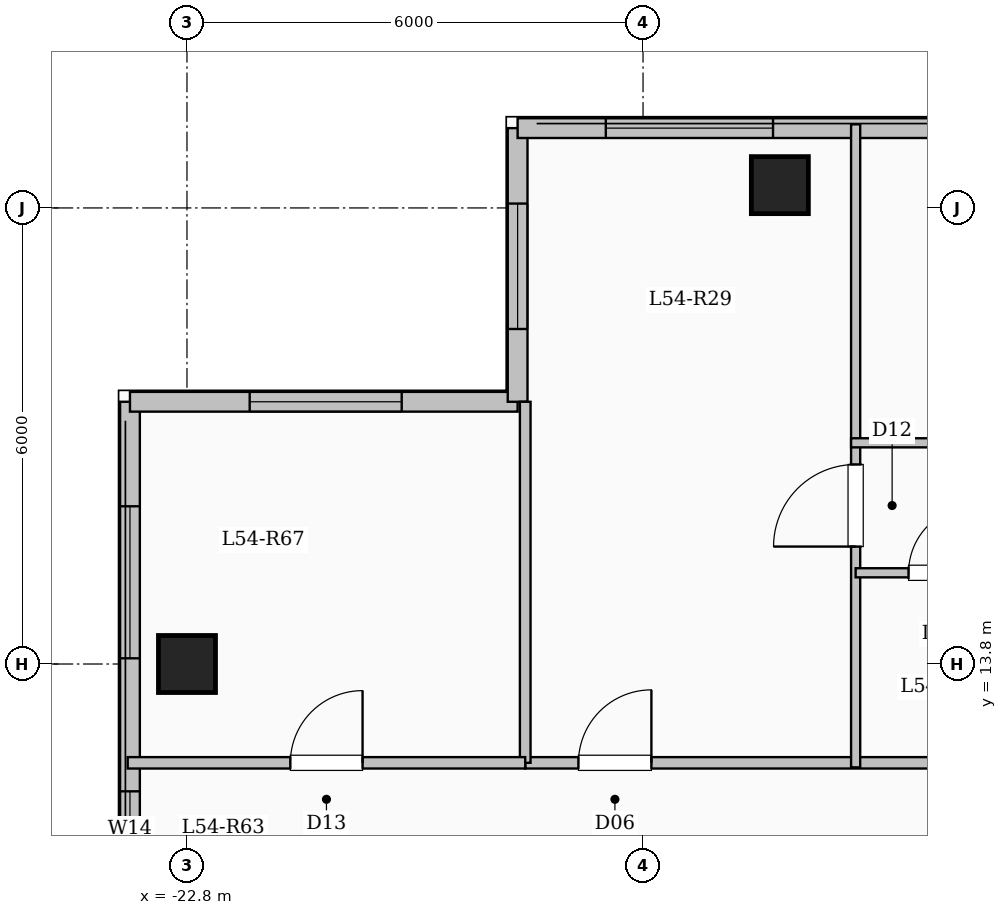
"""IFC4 building model, lengths in metres.
Left out: names, types, materials, properties, quantities, classifications, styles, units other than length and angle.
Written with IfcOpenShell. Run it as: python <this file> out.ifc"""

import sys

from ifc_helpers import new_model, si_unit, direction, frame, frame_2d, origin, origin_2d, place, context, subcontext, project, spatial, rectangle, extrude, element, fill, save


model = new_model("IFC4")
c1 = context("Model", 3, precision=1e-05, world=origin(), true_north=direction((0.0, 1.0)))
c2 = subcontext(c1, "Body", "Model", "MODEL_VIEW")
j1 = project(units=[si_unit("LENGTHUNIT", "METRE"), si_unit("PLANEANGLEUNIT", "RADIAN")], contexts=[c1])
p1 = place(None, origin())
s1 = spatial("IfcSite", under=j1, at=p1, CompositionType="ELEMENT")
p2 = place(p1, origin())
s2 = spatial("IfcBuilding", under=s1, at=p2, CompositionType="ELEMENT")
p3 = place(p2, frame((0.0, 0.0, 200.3)))
s3 = spatial("IfcBuildingStorey", under=s2, at=p3, CompositionType="ELEMENT", Elevation=200.3)
for number, where, z_axis, x_axis in (
    (1, (-15.0, 20.1, 0.0), (0.0, 0.0, 1.0), (1.0, 0.0, 0.0)),
    (2, (-22.8, 13.8, 0.0), (0.0, 0.0, 1.0), (1.0, 0.0, 0.0)),
):
    element("IfcColumn", number, at=place(p3, frame(where, z_axis=z_axis, x_axis=x_axis)), inside=s3, PredefinedType="COLUMN", context=c2, shape_type="SweptSolid", body=[
        extrude(rectangle(XDim=0.75, YDim=0.75, at=origin_2d()), origin(), (0.0, 0.0, 1.0), 3.35),
    ])
p4 = place(p3, frame((-23.55, -17.25, 0.0), z_axis=(0.0, 0.0, 1.0), x_axis=(0.0, 1.0, 0.0)))
e3 = element("IfcWall", 3, at=p4, inside=s3, PredefinedType="SOLIDWALL", context=c2, shape_type="SweptSolid", body=[
    extrude(rectangle(XDim=34.5, YDim=0.26, at=frame_2d((17.25, 0.0))), origin(), (0.0, 0.0, 1.0), 3.1),
])
p5 = place(p4, frame((2.825, 0.0, 0.9)))
e4 = element("IfcOpeningElement", 4, at=p5, cuts=e3, PredefinedType="OPENING", context=c2, shape_type="SweptSolid", body=[
    extrude(rectangle(XDim=2.2, YDim=1.75, at=frame_2d((1.1, 0.875))), frame((0.0, 0.14, 0.0), z_axis=(0.0, -1.0, 0.0), x_axis=(1.0, 0.0, 0.0)), (0.0, 0.0, 1.0), 0.28),
])
p6 = place(p4, frame((8.325, 0.0, 0.95)))
e5 = element("IfcOpeningElement", 5, at=p6, cuts=e3, PredefinedType="OPENING", context=c2, shape_type="SweptSolid", body=[
    extrude(rectangle(XDim=1.2, YDim=1.5, at=frame_2d((0.6, 0.75))), frame((0.0, 0.14, 0.0), z_axis=(0.0, -1.0, 0.0), x_axis=(1.0, 0.0, 0.0)), (0.0, 0.0, 1.0), 0.28),
])
p7 = place(p4, frame((13.25, 0.0, 0.9)))
e6 = element("IfcOpeningElement", 6, at=p7, cuts=e3, PredefinedType="OPENING", context=c2, shape_type="SweptSolid", body=[
    extrude(rectangle(XDim=2.2, YDim=1.75, at=frame_2d((1.1, 0.875))), frame((0.0, 0.14, 0.0), z_axis=(0.0, -1.0, 0.0), x_axis=(1.0, 0.0, 0.0)), (0.0, 0.0, 1.0), 0.28),
])
p8 = place(p4, frame((19.65, 0.0, 0.9)))
e7 = element("IfcOpeningElement", 7, at=p8, cuts=e3, PredefinedType="OPENING", context=c2, shape_type="SweptSolid", body=[
    extrude(rectangle(XDim=1.65, YDim=1.6, at=frame_2d((0.825, 0.8))), frame((0.0, 0.14, 0.0), z_axis=(0.0, -1.0, 0.0), x_axis=(1.0, 0.0, 0.0)), (0.0, 0.0, 1.0), 0.28),
])
p9 = place(p4, frame((24.125, 0.0, 0.9)))
e8 = element("IfcOpeningElement", 8, at=p9, cuts=e3, PredefinedType="OPENING", context=c2, shape_type="SweptSolid", body=[
    extrude(rectangle(XDim=2.0, YDim=1.7, at=frame_2d((1.0, 0.85))), frame((0.0, 0.14, 0.0), z_axis=(0.0, -1.0, 0.0), x_axis=(1.0, 0.0, 0.0)), (0.0, 0.0, 1.0), 0.28),
])
p10 = place(p4, frame((28.375, 0.0, 0.95)))
e9 = element("IfcOpeningElement", 9, at=p10, cuts=e3, PredefinedType="OPENING", context=c2, shape_type="SweptSolid", body=[
    extrude(rectangle(XDim=1.0, YDim=1.5, at=frame_2d((0.5, 0.75))), frame((0.0, 0.14, 0.0), z_axis=(0.0, -1.0, 0.0), x_axis=(1.0, 0.0, 0.0)), (0.0, 0.0, 1.0), 0.28),
])
p11 = place(p4, frame((31.125, 0.0, 0.9)))
e10 = element("IfcOpeningElement", 10, at=p11, cuts=e3, PredefinedType="OPENING", context=c2, shape_type="SweptSolid", body=[
    extrude(rectangle(XDim=2.0, YDim=1.7, at=frame_2d((1.0, 0.85))), frame((0.0, 0.14, 0.0), z_axis=(0.0, -1.0, 0.0), x_axis=(1.0, 0.0, 0.0)), (0.0, 0.0, 1.0), 0.28),
])
p12 = place(p3, frame((-23.55, 17.25, 0.0), z_axis=(0.0, 0.0, 1.0), x_axis=(1.0, 0.0, 0.0)))
e11 = element("IfcWall", 11, at=p12, inside=s3, PredefinedType="SOLIDWALL", context=c2, shape_type="SweptSolid", body=[
    extrude(rectangle(XDim=5.1, YDim=0.26, at=frame_2d((2.55, 0.0))), origin(), (0.0, 0.0, 1.0), 3.1),
])
p13 = place(p12, frame((1.575, 0.0, 0.9)))
e12 = element("IfcOpeningElement", 12, at=p13, cuts=e11, PredefinedType="OPENING", context=c2, shape_type="SweptSolid", body=[
    extrude(rectangle(XDim=2.0, YDim=1.7, at=frame_2d((1.0, 0.85))), frame((0.0, 0.14, 0.0), z_axis=(0.0, -1.0, 0.0), x_axis=(1.0, 0.0, 0.0)), (0.0, 0.0, 1.0), 0.28),
])
p14 = place(p3, frame((-18.45, 17.25, 0.0), z_axis=(0.0, 0.0, 1.0), x_axis=(0.0, 1.0, 0.0)))
e13 = element("IfcWall", 13, at=p14, inside=s3, PredefinedType="SOLIDWALL", context=c2, shape_type="SweptSolid", body=[
    extrude(rectangle(XDim=3.6, YDim=0.26, at=frame_2d((1.8, 0.0))), origin(), (0.0, 0.0, 1.0), 3.1),
])
p15 = place(p14, frame((0.958, 0.0, 0.9)))
e14 = element("IfcOpeningElement", 14, at=p15, cuts=e13, PredefinedType="OPENING", context=c2, shape_type="SweptSolid", body=[
    extrude(rectangle(XDim=1.65, YDim=1.6, at=frame_2d((0.825, 0.8))), frame((0.0, 0.14, 0.0), z_axis=(0.0, -1.0, 0.0), x_axis=(1.0, 0.0, 0.0)), (0.0, 0.0, 1.0), 0.28),
])
p16 = place(p3, frame((-18.45, 20.85, 0.0), z_axis=(0.0, 0.0, 1.0), x_axis=(1.0, 0.0, 0.0)))
e15 = element("IfcWall", 15, at=p16, inside=s3, PredefinedType="SOLIDWALL", context=c2, shape_type="SweptSolid", body=[
    extrude(rectangle(XDim=11.1, YDim=0.26, at=frame_2d((5.55, 0.0))), origin(), (0.0, 0.0, 1.0), 3.1),
])
p17 = place(p16, frame((1.16, 0.0, 0.9)))
e16 = element("IfcOpeningElement", 16, at=p17, cuts=e15, PredefinedType="OPENING", context=c2, shape_type="SweptSolid", body=[
    extrude(rectangle(XDim=2.2, YDim=1.75, at=frame_2d((1.1, 0.875))), frame((0.0, 0.14, 0.0), z_axis=(0.0, -1.0, 0.0), x_axis=(1.0, 0.0, 0.0)), (0.0, 0.0, 1.0), 0.28),
])
p18 = place(p16, frame((5.805, 0.0, 0.9)))
e17 = element("IfcOpeningElement", 17, at=p18, cuts=e15, PredefinedType="OPENING", context=c2, shape_type="SweptSolid", body=[
    extrude(rectangle(XDim=1.65, YDim=1.6, at=frame_2d((0.825, 0.8))), frame((0.0, 0.14, 0.0), z_axis=(0.0, -1.0, 0.0), x_axis=(1.0, 0.0, 0.0)), (0.0, 0.0, 1.0), 0.28),
])
p19 = place(p16, frame((9.42, 0.0, 0.95)))
e18 = element("IfcOpeningElement", 18, at=p19, cuts=e15, PredefinedType="OPENING", context=c2, shape_type="SweptSolid", body=[
    extrude(rectangle(XDim=1.2, YDim=1.5, at=frame_2d((0.6, 0.75))), frame((0.0, 0.14, 0.0), z_axis=(0.0, -1.0, 0.0), x_axis=(1.0, 0.0, 0.0)), (0.0, 0.0, 1.0), 0.28),
])
p20 = place(p3, frame((-18.35, 12.5, 0.0), z_axis=(0.0, 0.0, 1.0), x_axis=(1.0, 0.0, 0.0)))
e19 = element("IfcWall", 19, at=p20, inside=s3, PredefinedType="PARTITIONING", context=c2, shape_type="SweptSolid", body=[
    extrude(rectangle(XDim=14.5, YDim=0.15, at=frame_2d((7.25, 0.0))), origin(), (0.0, 0.0, 1.0), 3.1),
])
p21 = place(p20, frame((0.7, 0.0, 0.0)))
e20 = element("IfcOpeningElement", 20, at=p21, cuts=e19, PredefinedType="OPENING", context=c2, shape_type="SweptSolid", body=[
    extrude(rectangle(XDim=0.96, YDim=2.15, at=frame_2d((0.48, 1.075))), frame((0.0, 0.085, 0.0), z_axis=(0.0, -1.0, 0.0), x_axis=(1.0, 0.0, 0.0)), (0.0, 0.0, 1.0), 0.17),
])
p22 = place(p20, frame((9.394, 0.0, 0.0)))
e21 = element("IfcOpeningElement", 21, at=p22, cuts=e19, PredefinedType="OPENING", context=c2, shape_type="SweptSolid", body=[
    extrude(rectangle(XDim=0.96, YDim=2.15, at=frame_2d((0.48, 1.075))), frame((0.0, 0.085, 0.0), z_axis=(0.0, -1.0, 0.0), x_axis=(1.0, 0.0, 0.0)), (0.0, 0.0, 1.0), 0.17),
])
p23 = place(p3, frame((-14.003, 12.44, 0.0), z_axis=(0.0, 0.0, 1.0), x_axis=(0.0, 1.0, 0.0)))
e22 = element("IfcWall", 22, at=p23, inside=s3, PredefinedType="PARTITIONING", context=c2, shape_type="SweptSolid", body=[
    extrude(rectangle(XDim=8.46, YDim=0.12, at=frame_2d((4.23, 0.0))), origin(), (0.0, 0.0, 1.0), 3.1),
])
p24 = place(p23, frame((2.905, 0.0, 0.0)))
e23 = element("IfcOpeningElement", 23, at=p24, cuts=e22, PredefinedType="OPENING", context=c2, shape_type="SweptSolid", body=[
    extrude(rectangle(XDim=1.08, YDim=2.15, at=frame_2d((0.54, 1.075))), frame((0.0, 0.07, 0.0), z_axis=(0.0, -1.0, 0.0), x_axis=(1.0, 0.0, 0.0)), (0.0, 0.0, 1.0), 0.14),
])
p25 = place(p3, frame((-14.003, 15.0, 0.0), z_axis=(0.0, 0.0, 1.0), x_axis=(1.0, 0.0, 0.0)))
e24 = element("IfcWall", 24, at=p25, inside=s3, PredefinedType="PARTITIONING", context=c2, shape_type="SweptSolid", body=[
    extrude(rectangle(XDim=2.272, YDim=0.12, at=frame_2d((1.136, 0.0))), origin(), (0.0, 0.0, 1.0), 3.1),
])
p26 = place(p25, frame((0.696, 0.0, 0.0)))
e25 = element("IfcOpeningElement", 25, at=p26, cuts=e24, PredefinedType="OPENING", context=c2, shape_type="SweptSolid", body=[
    extrude(rectangle(XDim=0.88, YDim=2.1, at=frame_2d((0.44, 1.05))), frame((0.0, 0.07, 0.0), z_axis=(0.0, -1.0, 0.0), x_axis=(1.0, 0.0, 0.0)), (0.0, 0.0, 1.0), 0.14),
])
p27 = place(p3, frame((-14.063, 16.71, 0.0), z_axis=(0.0, 0.0, 1.0), x_axis=(1.0, 0.0, 0.0)))
e26 = element("IfcWall", 26, at=p27, inside=s3, PredefinedType="PARTITIONING", context=c2, shape_type="SweptSolid", body=[
    extrude(rectangle(XDim=4.467, YDim=0.12, at=frame_2d((2.233, 0.0))), origin(), (0.0, 0.0, 1.0), 2.725),
])
p28 = place(p27, frame((1.703, 0.0, 0.0)))
e27 = element("IfcOpeningElement", 27, at=p28, cuts=e26, PredefinedType="OPENING", context=c2, shape_type="SweptSolid", body=[
    extrude(rectangle(XDim=0.88, YDim=2.1, at=frame_2d((0.44, 1.05))), frame((0.0, 0.07, 0.0), z_axis=(0.0, -1.0, 0.0), x_axis=(1.0, 0.0, 0.0)), (0.0, 0.0, 1.0), 0.14),
])
p29 = place(p3, frame((-18.35, 12.5, 0.0), z_axis=(0.0, 0.0, 1.0), x_axis=(0.0, 1.0, 0.0)))
e28 = element("IfcWall", 28, at=p29, inside=s3, PredefinedType="PARTITIONING", context=c2, shape_type="SweptSolid", body=[
    extrude(rectangle(XDim=4.75, YDim=0.14, at=frame_2d((2.375, 0.0))), origin(), (0.0, 0.0, 1.0), 3.1),
])
p30 = place(p3, frame((-23.58, 12.5, 0.0), z_axis=(0.0, 0.0, 1.0), x_axis=(1.0, 0.0, 0.0)))
e29 = element("IfcWall", 29, at=p30, inside=s3, PredefinedType="PARTITIONING", context=c2, shape_type="SweptSolid", body=[
    extrude(rectangle(XDim=5.23, YDim=0.15, at=frame_2d((2.615, 0.0))), origin(), (0.0, 0.0, 1.0), 3.1),
])
p31 = place(p30, frame((2.14, 0.0, 0.0)))
e30 = element("IfcOpeningElement", 30, at=p31, cuts=e29, PredefinedType="OPENING", context=c2, shape_type="SweptSolid", body=[
    extrude(rectangle(XDim=0.95, YDim=2.15, at=frame_2d((0.475, 1.075))), frame((0.0, 0.085, 0.0), z_axis=(0.0, -1.0, 0.0), x_axis=(1.0, 0.0, 0.0)), (0.0, 0.0, 1.0), 0.17),
])
p32 = place(p10, origin())
e31 = element("IfcWindow", 31, at=p32, inside=s3, PartitioningType="SINGLE_PANEL", PredefinedType="WINDOW", context=c2, shape_type="SweptSolid", body=[
    extrude(rectangle(XDim=1.0, YDim=1.5, at=frame_2d((0.5, 0.75))), frame((0.0, 0.03, 0.0), z_axis=(0.0, -1.0, 0.0), x_axis=(1.0, 0.0, 0.0)), (0.0, 0.0, 1.0), 0.06),
])
fill(e9, e31)
p33 = place(p11, origin())
e32 = element("IfcWindow", 32, at=p33, inside=s3, PartitioningType="SINGLE_PANEL", PredefinedType="WINDOW", context=c2, shape_type="SweptSolid", body=[
    extrude(rectangle(XDim=2.0, YDim=1.7, at=frame_2d((1.0, 0.85))), frame((0.0, 0.03, 0.0), z_axis=(0.0, -1.0, 0.0), x_axis=(1.0, 0.0, 0.0)), (0.0, 0.0, 1.0), 0.06),
])
fill(e10, e32)
p34 = place(p13, origin())
e33 = element("IfcWindow", 33, at=p34, inside=s3, PartitioningType="SINGLE_PANEL", PredefinedType="WINDOW", context=c2, shape_type="SweptSolid", body=[
    extrude(rectangle(XDim=2.0, YDim=1.7, at=frame_2d((1.0, 0.85))), frame((0.0, 0.03, 0.0), z_axis=(0.0, -1.0, 0.0), x_axis=(1.0, 0.0, 0.0)), (0.0, 0.0, 1.0), 0.06),
])
fill(e12, e33)
p35 = place(p15, origin())
e34 = element("IfcWindow", 34, at=p35, inside=s3, PartitioningType="SINGLE_PANEL", PredefinedType="WINDOW", context=c2, shape_type="SweptSolid", body=[
    extrude(rectangle(XDim=1.65, YDim=1.6, at=frame_2d((0.825, 0.8))), frame((0.0, 0.03, 0.0), z_axis=(0.0, -1.0, 0.0), x_axis=(1.0, 0.0, 0.0)), (0.0, 0.0, 1.0), 0.06),
])
fill(e14, e34)
p36 = place(p17, origin())
e35 = element("IfcWindow", 35, at=p36, inside=s3, PartitioningType="SINGLE_PANEL", PredefinedType="WINDOW", context=c2, shape_type="SweptSolid", body=[
    extrude(rectangle(XDim=2.2, YDim=1.75, at=frame_2d((1.1, 0.875))), frame((0.0, 0.03, 0.0), z_axis=(0.0, -1.0, 0.0), x_axis=(1.0, 0.0, 0.0)), (0.0, 0.0, 1.0), 0.06),
])
fill(e16, e35)
p37 = place(p21, origin())
e36 = element("IfcDoor", 36, at=p37, inside=s3, OperationType="SINGLE_SWING_RIGHT", PredefinedType="DOOR", context=c2, shape_type="SweptSolid", body=[
    extrude(rectangle(XDim=0.96, YDim=2.15, at=frame_2d((0.48, 1.075))), frame((0.0, 0.025, 0.0), z_axis=(0.0, -1.0, 0.0), x_axis=(1.0, 0.0, 0.0)), (0.0, 0.0, 1.0), 0.05),
])
fill(e20, e36)
p38 = place(p24, origin())
e37 = element("IfcDoor", 37, at=p38, inside=s3, OperationType="SINGLE_SWING_LEFT", PredefinedType="DOOR", context=c2, shape_type="SweptSolid", body=[
    extrude(rectangle(XDim=1.08, YDim=2.15, at=frame_2d((0.54, 1.075))), frame((0.0, 0.025, 0.0), z_axis=(0.0, -1.0, 0.0), x_axis=(1.0, 0.0, 0.0)), (0.0, 0.0, 1.0), 0.05),
])
fill(e23, e37)
p39 = place(p26, origin())
e38 = element("IfcDoor", 38, at=p39, inside=s3, OperationType="SINGLE_SWING_RIGHT", PredefinedType="DOOR", context=c2, shape_type="SweptSolid", body=[
    extrude(rectangle(XDim=0.88, YDim=2.1, at=frame_2d((0.44, 1.05))), frame((0.0, 0.025, 0.0), z_axis=(0.0, -1.0, 0.0), x_axis=(1.0, 0.0, 0.0)), (0.0, 0.0, 1.0), 0.05),
])
fill(e25, e38)
p40 = place(p31, origin())
e39 = element("IfcDoor", 39, at=p40, inside=s3, OperationType="SINGLE_SWING_RIGHT", PredefinedType="DOOR", context=c2, shape_type="SweptSolid", body=[
    extrude(rectangle(XDim=0.95, YDim=2.15, at=frame_2d((0.475, 1.075))), frame((0.0, 0.025, 0.0), z_axis=(0.0, -1.0, 0.0), x_axis=(1.0, 0.0, 0.0)), (0.0, 0.0, 1.0), 0.05),
])
fill(e30, e39)
save(model, sys.argv[1])
